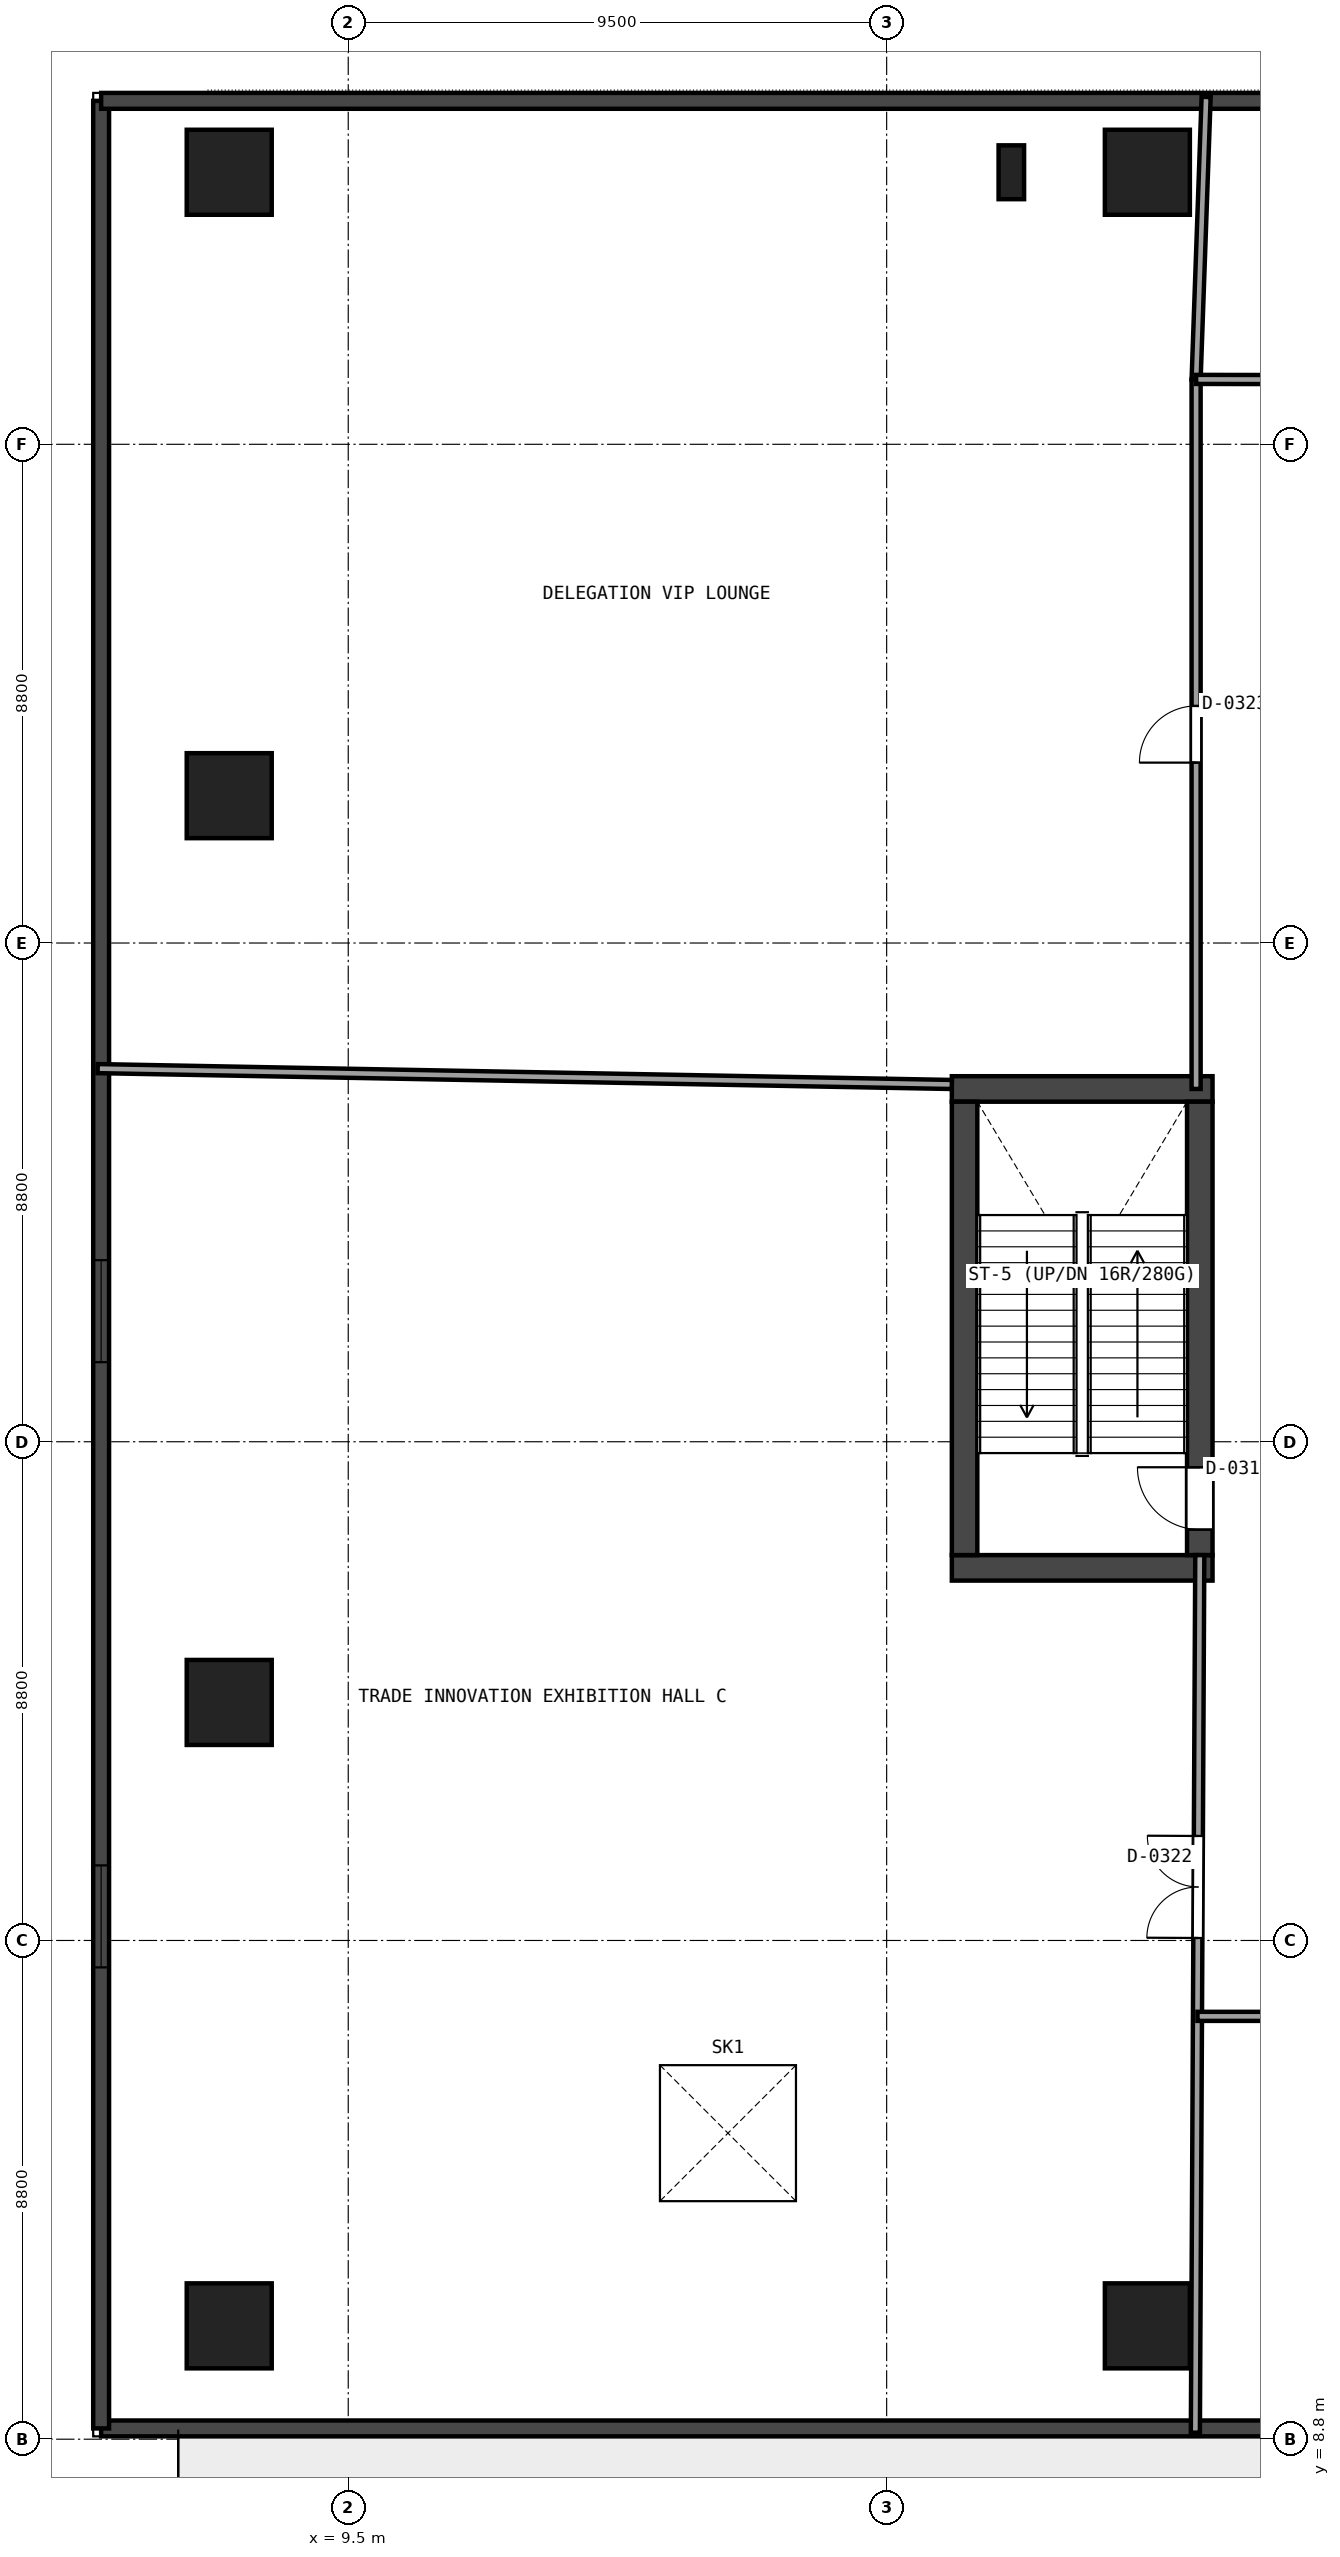
"""IFC4 building model, lengths in metres.
Left out: names, types, materials, properties, quantities, classifications, styles, units other than length and angle.
Written with IfcOpenShell. Run it as: python <this file> out.ifc"""

import sys

from ifc_helpers import new_model, si_unit, direction, frame, frame_2d, origin, origin_2d, place, context, subcontext, project, spatial, rectangle, extrude, element, fill, save


model = new_model("IFC4")
c1 = context("Model", 3, precision=1e-05, world=origin(), true_north=direction((0.0, 1.0)))
c2 = subcontext(c1, "Body", "Model", "MODEL_VIEW")
j1 = project(units=[si_unit("LENGTHUNIT", "METRE"), si_unit("PLANEANGLEUNIT", "RADIAN")], contexts=[c1])
p1 = place(None, origin())
s1 = spatial("IfcSite", under=j1, at=p1, CompositionType="ELEMENT")
p2 = place(p1, origin())
s2 = spatial("IfcBuilding", under=s1, at=p2, CompositionType="ELEMENT")
p3 = place(p2, frame((0.0, 0.0, 16.2)))
s3 = spatial("IfcBuildingStorey", under=s2, at=p3, CompositionType="ELEMENT", Elevation=16.2)
for number, where, z_axis, x_axis in (
    (1, (20.15, 24.175, 0.0), (0.0, 0.0, 1.0), (1.0, 0.0, 0.0)),
    (2, (20.15, 32.625, 0.0), (0.0, 0.0, 1.0), (1.0, 0.0, 0.0)),
):
    element("IfcWall", number, at=place(p3, frame(where, z_axis=z_axis, x_axis=x_axis)), inside=s3, PredefinedType="SHEAR", context=c2, shape_type="SweptSolid", body=[
        extrude(rectangle(XDim=4.6, YDim=0.45, at=frame_2d((2.3, 0.0))), origin(), (0.0, 0.0, 1.0), 4.98),
    ])
p4 = place(p3, frame((20.375, 24.4, 0.0), z_axis=(0.0, 0.0, 1.0), x_axis=(0.0, 1.0, 0.0)))
e3 = element("IfcWall", 3, at=p4, inside=s3, PredefinedType="SHEAR", context=c2, shape_type="SweptSolid", body=[
    extrude(rectangle(XDim=8.0, YDim=0.45, at=frame_2d((4.0, 0.0))), origin(), (0.0, 0.0, 1.0), 4.98),
])
p5 = place(p3, frame((24.525, 24.4, 0.0), z_axis=(0.0, 0.0, 1.0), x_axis=(0.0, 1.0, 0.0)))
e4 = element("IfcWall", 4, at=p5, inside=s3, PredefinedType="SHEAR", context=c2, shape_type="SweptSolid", body=[
    extrude(rectangle(XDim=8.0, YDim=0.45, at=frame_2d((4.0, 0.0))), origin(), (0.0, 0.0, 1.0), 4.98),
])
p6 = place(p5, frame((0.45, 0.0, 0.0)))
e5 = element("IfcOpeningElement", 5, at=p6, cuts=e4, PredefinedType="OPENING", context=c2, shape_type="SweptSolid", body=[
    extrude(rectangle(XDim=1.1, YDim=2.15, at=frame_2d((0.55, 1.075))), frame((0.0, 0.235, 0.0), z_axis=(0.0, -1.0, 0.0), x_axis=(1.0, 0.0, 0.0)), (0.0, 0.0, 1.0), 0.47),
])
for number, where, z_axis, x_axis in (
    (6, (7.4, 10.8, 0.0), (0.0, 0.0, 1.0), (1.0, 0.0, 0.0)),
    (7, (23.6, 10.8, 0.0), (0.0, 0.0, 1.0), (1.0, 0.0, 0.0)),
    (8, (23.6, 48.8, 0.0), (0.0, 0.0, 1.0), (1.0, 0.0, 0.0)),
    (9, (7.4, 48.8, 0.0), (0.0, 0.0, 1.0), (1.0, 0.0, 0.0)),
    (10, (7.4, 37.8, 0.0), (0.0, 0.0, 1.0), (1.0, 0.0, 0.0)),
    (11, (7.4, 21.8, 0.0), (0.0, 0.0, 1.0), (1.0, 0.0, 0.0)),
):
    element("IfcColumn", number, at=place(p3, frame(where, z_axis=z_axis, x_axis=x_axis)), inside=s3, PredefinedType="COLUMN", context=c2, shape_type="SweptSolid", body=[
        extrude(rectangle(XDim=1.5, YDim=1.5, at=origin_2d()), origin(), (0.0, 0.0, 1.0), 4.98),
    ])
p7 = place(p3, frame((21.2, 48.8, 0.0), z_axis=(0.0, 0.0, 1.0), x_axis=(1.0, 0.0, 0.0)))
e12 = element("IfcColumn", 12, at=p7, inside=s3, PredefinedType="PILASTER", context=c2, shape_type="SweptSolid", body=[
    extrude(rectangle(XDim=0.45, YDim=0.95, at=origin_2d()), origin(), (0.0, 0.0, 1.0), 4.98),
])
p8 = place(p3, frame((69.66, 8.99, 0.0), z_axis=(0.0, 0.0, 1.0), x_axis=(-1.0, 0.0, 0.0)))
e13 = element("IfcWall", 13, at=p8, inside=s3, PredefinedType="SOLIDWALL", context=c2, shape_type="SweptSolid", body=[
    extrude(rectangle(XDim=64.52, YDim=0.28, at=frame_2d((32.26, 0.0))), origin(), (0.0, 0.0, 1.0), 4.98),
])
p9 = place(p8, frame((13.294, 0.0, 0.95)))
e14 = element("IfcOpeningElement", 14, at=p9, cuts=e13, PredefinedType="OPENING", context=c2, shape_type="SweptSolid", body=[
    extrude(rectangle(XDim=1.8, YDim=2.3, at=frame_2d((0.9, 1.15))), frame((0.0, 0.15, 0.0), z_axis=(0.0, -1.0, 0.0), x_axis=(1.0, 0.0, 0.0)), (0.0, 0.0, 1.0), 0.3),
])
p10 = place(p8, frame((34.06, 0.0, 0.0)))
e15 = element("IfcOpeningElement", 15, at=p10, cuts=e13, PredefinedType="OPENING", context=c2, shape_type="SweptSolid", body=[
    extrude(rectangle(XDim=1.2, YDim=2.2, at=frame_2d((0.6, 1.1))), frame((0.0, 0.15, 0.0), z_axis=(0.0, -1.0, 0.0), x_axis=(1.0, 0.0, 0.0)), (0.0, 0.0, 1.0), 0.3),
])
p11 = place(p3, frame((5.14, 8.99, 0.0), z_axis=(0.0, 0.0, 1.0), x_axis=(0.0, 1.0, 0.0)))
e16 = element("IfcWall", 16, at=p11, inside=s3, PredefinedType="SOLIDWALL", context=c2, shape_type="SweptSolid", body=[
    extrude(rectangle(XDim=41.07, YDim=0.28, at=frame_2d((20.535, 0.0))), origin(), (0.0, 0.0, 1.0), 4.98),
])
p12 = place(p11, frame((8.135, 0.0, 0.95)))
e17 = element("IfcOpeningElement", 17, at=p12, cuts=e16, PredefinedType="OPENING", context=c2, shape_type="SweptSolid", body=[
    extrude(rectangle(XDim=1.8, YDim=2.3, at=frame_2d((0.9, 1.15))), frame((0.0, 0.15, 0.0), z_axis=(0.0, -1.0, 0.0), x_axis=(1.0, 0.0, 0.0)), (0.0, 0.0, 1.0), 0.3),
])
p13 = place(p11, frame((18.814, 0.0, 0.95)))
e18 = element("IfcOpeningElement", 18, at=p13, cuts=e16, PredefinedType="OPENING", context=c2, shape_type="SweptSolid", body=[
    extrude(rectangle(XDim=1.8, YDim=2.3, at=frame_2d((0.9, 1.15))), frame((0.0, 0.15, 0.0), z_axis=(0.0, -1.0, 0.0), x_axis=(1.0, 0.0, 0.0)), (0.0, 0.0, 1.0), 0.3),
])
p14 = place(p3, frame((5.14, 50.06, 0.0), z_axis=(0.0, 0.0, 1.0), x_axis=(1.0, 0.0, 0.0)))
e19 = element("IfcWall", 19, at=p14, inside=s3, PredefinedType="SOLIDWALL", context=c2, shape_type="SweptSolid", body=[
    extrude(rectangle(XDim=64.52, YDim=0.28, at=frame_2d((32.26, 0.0))), origin(), (0.0, 0.0, 1.0), 4.98),
])
p15 = place(p14, frame((30.07, 0.0, 0.95)))
e20 = element("IfcOpeningElement", 20, at=p15, cuts=e19, PredefinedType="OPENING", context=c2, shape_type="SweptSolid", body=[
    extrude(rectangle(XDim=1.8, YDim=2.3, at=frame_2d((0.9, 1.15))), frame((0.0, 0.15, 0.0), z_axis=(0.0, -1.0, 0.0), x_axis=(1.0, 0.0, 0.0)), (0.0, 0.0, 1.0), 0.3),
])
p16 = place(p3, frame((24.447, 8.915, 0.0), z_axis=(0.0, 0.0, 1.0), x_axis=(0.005029419566, 0.999987352389, 0.0)))
e21 = element("IfcWall", 21, at=p16, inside=s3, PredefinedType="PARTITIONING", context=c2, shape_type="SweptSolid", body=[
    extrude(rectangle(XDim=15.485, YDim=0.16, at=frame_2d((7.743, 0.0))), origin(), (0.0, 0.0, 1.0), 4.065),
])
p17 = place(p16, frame((8.729, 0.0, 0.0)))
e22 = element("IfcOpeningElement", 22, at=p17, cuts=e21, PredefinedType="OPENING", context=c2, shape_type="SweptSolid", body=[
    extrude(rectangle(XDim=1.8, YDim=2.25, at=frame_2d((0.9, 1.125))), frame((0.0, 0.09, 0.0), z_axis=(0.0, -1.0, 0.0), x_axis=(1.0, 0.0, 0.0)), (0.0, 0.0, 1.0), 0.18),
])
p18 = place(p3, frame((20.15, 32.704, 0.0), z_axis=(0.0, 0.0, 1.0), x_axis=(-0.999827748064, 0.018560016187, 0.0)))
e23 = element("IfcWall", 23, at=p18, inside=s3, PredefinedType="PARTITIONING", context=c2, shape_type="SweptSolid", body=[
    extrude(rectangle(XDim=15.075, YDim=0.16, at=frame_2d((7.537, 0.0))), origin(), (0.0, 0.0, 1.0), 4.121),
])
p19 = place(p3, frame((24.46, 32.625, 0.0), z_axis=(0.0, 0.0, 1.0), x_axis=(0.0, 1.0, 0.0)))
e24 = element("IfcWall", 24, at=p19, inside=s3, PredefinedType="PARTITIONING", context=c2, shape_type="SweptSolid", body=[
    extrude(rectangle(XDim=12.515, YDim=0.16, at=frame_2d((6.257, 0.0))), origin(), (0.0, 0.0, 1.0), 4.065),
])
p20 = place(p19, frame((5.758, 0.0, 0.0)))
e25 = element("IfcOpeningElement", 25, at=p20, cuts=e24, PredefinedType="OPENING", context=c2, shape_type="SweptSolid", body=[
    extrude(rectangle(XDim=1.0, YDim=2.15, at=frame_2d((0.5, 1.075))), frame((0.0, 0.09, 0.0), z_axis=(0.0, -1.0, 0.0), x_axis=(1.0, 0.0, 0.0)), (0.0, 0.0, 1.0), 0.18),
])
p21 = place(p3, frame((24.46, 45.14, 0.0), z_axis=(0.0, 0.0, 1.0), x_axis=(0.035456038504, 0.999371236995, 0.0)))
e26 = element("IfcWall", 26, at=p21, inside=s3, PredefinedType="PARTITIONING", context=c2, shape_type="SweptSolid", body=[
    extrude(rectangle(XDim=4.992, YDim=0.16, at=frame_2d((2.496, 0.0))), origin(), (0.0, 0.0, 1.0), 4.065),
])
p22 = place(p3, frame((57.4, 16.26, 0.0), z_axis=(0.0, 0.0, 1.0), x_axis=(-0.99999999956, 2.9668308e-05, 0.0)))
e27 = element("IfcWall", 27, at=p22, inside=s3, PredefinedType="PARTITIONING", context=c2, shape_type="SweptSolid", body=[
    extrude(rectangle(XDim=32.916, YDim=0.16, at=frame_2d((16.458, 0.0))), origin(), (0.0, 0.0, 1.0), 4.133),
])
p23 = place(p22, frame((15.958, 0.0, 0.0)))
e28 = element("IfcOpeningElement", 28, at=p23, cuts=e27, PredefinedType="OPENING", context=c2, shape_type="SweptSolid", body=[
    extrude(rectangle(XDim=1.0, YDim=2.15, at=frame_2d((0.5, 1.075))), frame((0.0, 0.09, 0.0), z_axis=(0.0, -1.0, 0.0), x_axis=(1.0, 0.0, 0.0)), (0.0, 0.0, 1.0), 0.18),
])
p24 = place(p3, frame((24.46, 45.145, 0.0), z_axis=(0.0, 0.0, 1.0), x_axis=(0.999997863068, -0.002067331672, 0.0)))
e29 = element("IfcWall", 29, at=p24, inside=s3, PredefinedType="PARTITIONING", context=c2, shape_type="SweptSolid", body=[
    extrude(rectangle(XDim=2.48, YDim=0.16, at=frame_2d((1.24, 0.0))), origin(), (0.0, 0.0, 1.0), 4.065),
])
p25 = place(p12, origin())
e30 = element("IfcWindow", 30, at=p25, inside=s3, PartitioningType="SINGLE_PANEL", PredefinedType="WINDOW", context=c2, shape_type="SweptSolid", body=[
    extrude(rectangle(XDim=1.8, YDim=2.3, at=frame_2d((0.9, 1.15))), frame((0.0, 0.03, 0.0), z_axis=(0.0, -1.0, 0.0), x_axis=(1.0, 0.0, 0.0)), (0.0, 0.0, 1.0), 0.06),
])
fill(e17, e30)
p26 = place(p13, origin())
e31 = element("IfcWindow", 31, at=p26, inside=s3, PartitioningType="SINGLE_PANEL", PredefinedType="WINDOW", context=c2, shape_type="SweptSolid", body=[
    extrude(rectangle(XDim=1.8, YDim=2.3, at=frame_2d((0.9, 1.15))), frame((0.0, 0.03, 0.0), z_axis=(0.0, -1.0, 0.0), x_axis=(1.0, 0.0, 0.0)), (0.0, 0.0, 1.0), 0.06),
])
fill(e18, e31)
p27 = place(p3, frame((0.0, 0.0, -0.35)))
p28 = place(p27, frame((16.2, 14.2, 0.0)))
p29 = place(p28, frame((0.0, 0.0, 0.3)))
e32 = element("IfcWindow", 32, at=p29, inside=s3, PartitioningType="SINGLE_PANEL", PredefinedType="SKYLIGHT", context=c2, shape_type="SweptSolid", body=[
    extrude(rectangle(XDim=2.4, YDim=2.4, at=origin_2d()), origin(), (0.0, 0.0, 1.0), 0.05),
])
p30 = place(p6, origin())
e33 = element("IfcDoor", 33, at=p30, inside=s3, OperationType="SINGLE_SWING_RIGHT", PredefinedType="DOOR", context=c2, shape_type="SweptSolid", body=[
    extrude(rectangle(XDim=1.1, YDim=2.15, at=frame_2d((0.55, 1.075))), frame((0.0, 0.025, 0.0), z_axis=(0.0, -1.0, 0.0), x_axis=(1.0, 0.0, 0.0)), (0.0, 0.0, 1.0), 0.05),
])
fill(e5, e33)
p31 = place(p17, origin())
e34 = element("IfcDoor", 34, at=p31, inside=s3, OperationType="DOUBLE_DOOR_SINGLE_SWING", PredefinedType="DOOR", context=c2, shape_type="SweptSolid", body=[
    extrude(rectangle(XDim=1.8, YDim=2.25, at=frame_2d((0.9, 1.125))), frame((0.0, 0.025, 0.0), z_axis=(0.0, -1.0, 0.0), x_axis=(1.0, 0.0, 0.0)), (0.0, 0.0, 1.0), 0.05),
])
fill(e22, e34)
p32 = place(p20, origin())
e35 = element("IfcDoor", 35, at=p32, inside=s3, OperationType="SINGLE_SWING_LEFT", PredefinedType="DOOR", context=c2, shape_type="SweptSolid", body=[
    extrude(rectangle(XDim=1.0, YDim=2.15, at=frame_2d((0.5, 1.075))), frame((0.0, 0.025, 0.0), z_axis=(0.0, -1.0, 0.0), x_axis=(1.0, 0.0, 0.0)), (0.0, 0.0, 1.0), 0.05),
])
fill(e25, e35)
save(model, sys.argv[1])
